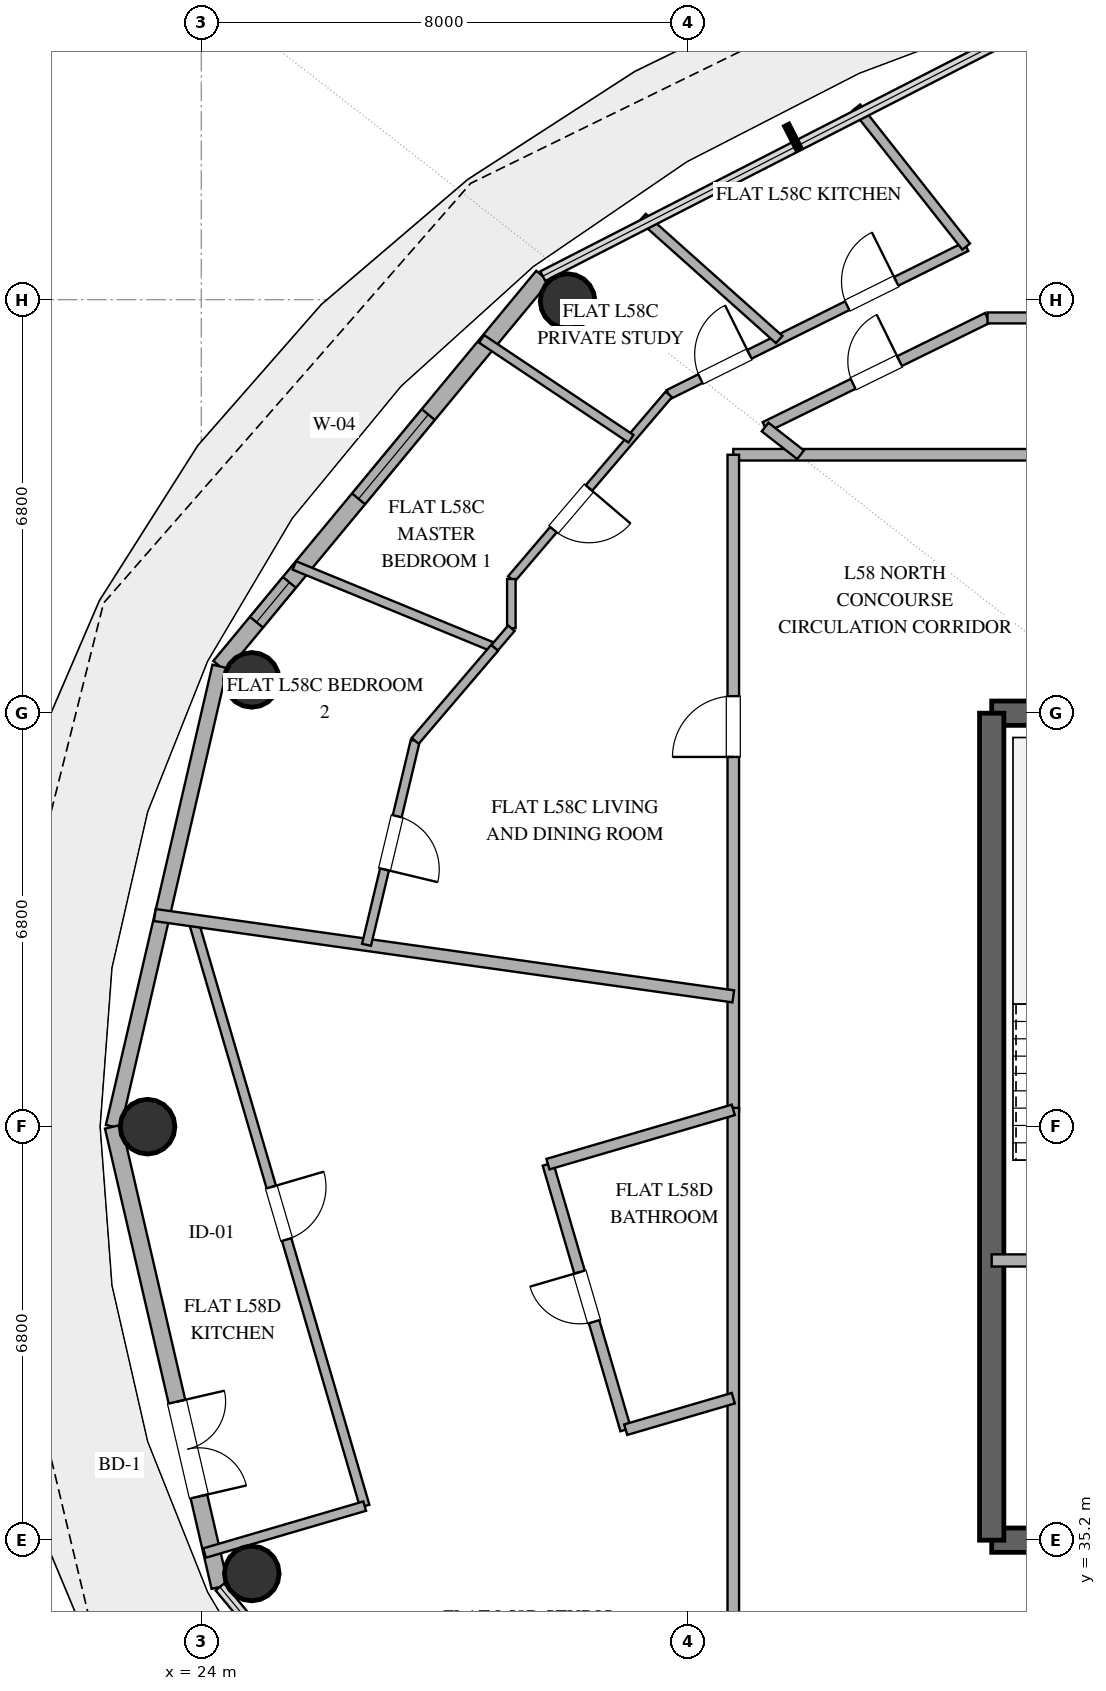
"""IFC4 building model, lengths in metres.
Left out: names, types, materials, properties, quantities, classifications, styles, units other than length and angle.
Written with IfcOpenShell. Run it as: python <this file> out.ifc"""

import sys

from ifc_helpers import new_model, si_unit, direction, frame, frame_2d, origin, origin_2d, place, context, subcontext, project, spatial, rectangle, hollow_circle, extrude, element, fill, save


model = new_model("IFC4")
c1 = context("Model", 3, precision=1e-05, world=origin(), true_north=direction((0.0, 1.0)))
c2 = subcontext(c1, "Body", "Model", "MODEL_VIEW")
j1 = project(units=[si_unit("LENGTHUNIT", "METRE"), si_unit("PLANEANGLEUNIT", "RADIAN")], contexts=[c1])
p1 = place(None, origin())
s1 = spatial("IfcSite", under=j1, at=p1, CompositionType="ELEMENT")
p2 = place(p1, origin())
s2 = spatial("IfcBuilding", under=s1, at=p2, CompositionType="ELEMENT")
p3 = place(p2, frame((0.0, 0.0, 228.0)))
s3 = spatial("IfcBuildingStorey", under=s2, at=p3, CompositionType="ELEMENT", Elevation=228.0)
p4 = place(p3, frame((37.0, 35.2, 0.0), z_axis=(0.0, 0.0, 1.0), x_axis=(1.0, 0.0, 0.0)))
e1 = element("IfcWall", 1, at=p4, inside=s3, PredefinedType="SHEAR", context=c2, shape_type="SweptSolid", body=[
    extrude(rectangle(XDim=4.0, YDim=0.4, at=frame_2d((2.0, 0.0))), origin(), (0.0, 0.0, 1.0), 3.36),
])
p5 = place(p4, frame((1.4, 0.0, 0.0)))
e2 = element("IfcOpeningElement", 2, at=p5, cuts=e1, PredefinedType="OPENING", context=c2, shape_type="SweptSolid", body=[
    extrude(rectangle(XDim=1.2, YDim=2.15, at=frame_2d((0.6, 1.075))), frame((0.0, 0.21, 0.0), z_axis=(0.0, -1.0, 0.0), x_axis=(1.0, 0.0, 0.0)), (0.0, 0.0, 1.0), 0.42),
])
p6 = place(p3, frame((37.0, 48.8, 0.0), z_axis=(0.0, 0.0, 1.0), x_axis=(1.0, 0.0, 0.0)))
e3 = element("IfcWall", 3, at=p6, inside=s3, PredefinedType="SHEAR", context=c2, shape_type="SweptSolid", body=[
    extrude(rectangle(XDim=4.0, YDim=0.4, at=frame_2d((2.0, 0.0))), origin(), (0.0, 0.0, 1.0), 3.36),
])
p7 = place(p3, frame((37.0, 35.2, 0.0), z_axis=(0.0, 0.0, 1.0), x_axis=(0.0, 1.0, 0.0)))
e4 = element("IfcWall", 4, at=p7, inside=s3, PredefinedType="SHEAR", context=c2, shape_type="SweptSolid", body=[
    extrude(rectangle(XDim=13.6, YDim=0.4, at=frame_2d((6.8, 0.0))), origin(), (0.0, 0.0, 1.0), 3.36),
])
for number, where, z_axis, x_axis in (
    (5, (30.025, 55.576, 0.0), (0.0, 0.0, 1.0), (1.0, 0.0, 0.0)),
    (6, (24.831, 49.347, 0.0), (0.0, 0.0, 1.0), (1.0, 0.0, 0.0)),
    (7, (23.117, 42.0, 0.0), (0.0, 0.0, 1.0), (1.0, 0.0, 0.0)),
    (8, (24.831, 34.653, 0.0), (0.0, 0.0, 1.0), (1.0, 0.0, 0.0)),
):
    element("IfcColumn", number, at=place(p3, frame(where, z_axis=z_axis, x_axis=x_axis)), inside=s3, PredefinedType="COLUMN", context=c2, shape_type="SweptSolid", body=[
        extrude(hollow_circle(Radius=0.45, WallThickness=0.025, at=origin_2d()), origin(), (0.0, 0.0, 1.0), 3.36),
    ])
p8 = place(p3, frame((29.617, 55.987, 0.0), z_axis=(0.0, 0.0, 1.0), x_axis=(-0.63761509934, -0.770355103243, 0.0)))
e9 = element("IfcWall", 9, at=p8, inside=s3, PredefinedType="SOLIDWALL", context=c2, shape_type="SweptSolid", body=[
    extrude(rectangle(XDim=8.33, YDim=0.28, at=frame_2d((4.165, 0.0))), origin(), (0.0, 0.0, 1.0), 3.36),
])
p9 = place(p8, frame((2.953, 0.0, 0.85)))
e10 = element("IfcOpeningElement", 10, at=p9, cuts=e9, PredefinedType="OPENING", context=c2, shape_type="SweptSolid", body=[
    extrude(rectangle(XDim=1.8, YDim=2.2, at=frame_2d((0.9, 1.1))), frame((0.0, 0.15, 0.0), z_axis=(0.0, -1.0, 0.0), x_axis=(1.0, 0.0, 0.0)), (0.0, 0.0, 1.0), 0.3),
])
p10 = place(p8, frame((6.536, 0.0, 0.85)))
e11 = element("IfcOpeningElement", 11, at=p10, cuts=e9, PredefinedType="OPENING", context=c2, shape_type="SweptSolid", body=[
    extrude(rectangle(XDim=0.85, YDim=1.8, at=frame_2d((0.425, 0.9))), frame((0.0, 0.15, 0.0), z_axis=(0.0, -1.0, 0.0), x_axis=(1.0, 0.0, 0.0)), (0.0, 0.0, 1.0), 0.3),
])
p11 = place(p3, frame((24.306, 49.57, 0.0), z_axis=(0.0, 0.0, 1.0), x_axis=(-0.225635078214, -0.974211892495, 0.0)))
e12 = element("IfcWall", 12, at=p11, inside=s3, PredefinedType="SOLIDWALL", context=c2, shape_type="SweptSolid", body=[
    extrude(rectangle(XDim=7.77, YDim=0.25, at=frame_2d((3.885, 0.0))), origin(), (0.0, 0.0, 1.0), 3.36),
])
p12 = place(p3, frame((22.553, 42.0, 0.0), z_axis=(0.0, 0.0, 1.0), x_axis=(0.225635078214, -0.974211892495, 0.0)))
e13 = element("IfcWall", 13, at=p12, inside=s3, PredefinedType="SOLIDWALL", context=c2, shape_type="SweptSolid", body=[
    extrude(rectangle(XDim=7.77, YDim=0.28, at=frame_2d((3.885, 0.0))), origin(), (0.0, 0.0, 1.0), 3.36),
])
p13 = place(p12, frame((4.642, 0.0, 0.0)))
e14 = element("IfcOpeningElement", 14, at=p13, cuts=e13, PredefinedType="OPENING", context=c2, shape_type="SweptSolid", body=[
    extrude(rectangle(XDim=1.6, YDim=2.25, at=frame_2d((0.8, 1.125))), frame((0.0, 0.15, 0.0), z_axis=(0.0, -1.0, 0.0), x_axis=(1.0, 0.0, 0.0)), (0.0, 0.0, 1.0), 0.3),
])
p14 = place(p3, frame((37.0, 39.8, 0.0), z_axis=(0.0, 0.0, 1.0), x_axis=(1.0, 0.0, 0.0)))
e15 = element("IfcWall", 15, at=p14, inside=s3, PredefinedType="SOLIDWALL", context=c2, shape_type="SweptSolid", body=[
    extrude(rectangle(XDim=4.0, YDim=0.2, at=frame_2d((2.0, 0.0))), origin(), (0.0, 0.0, 1.0), 2.72),
])
p15 = place(p14, frame((1.45, 0.0, 0.0)))
e16 = element("IfcOpeningElement", 16, at=p15, cuts=e15, PredefinedType="OPENING", context=c2, shape_type="SweptSolid", body=[
    extrude(rectangle(XDim=1.1, YDim=2.15, at=frame_2d((0.55, 1.075))), frame((0.0, 0.11, 0.0), z_axis=(0.0, -1.0, 0.0), x_axis=(1.0, 0.0, 0.0)), (0.0, 0.0, 1.0), 0.22),
])
p16 = place(p3, frame((23.868, 45.392, 0.0), z_axis=(0.0, 0.0, 1.0), x_axis=(0.281018983641, -0.959702209455, 0.0)))
e17 = element("IfcWall", 17, at=p16, inside=s3, PredefinedType="PLUMBINGWALL", context=c2, shape_type="SweptSolid", body=[
    extrude(rectangle(XDim=10.036, YDim=0.16, at=frame_2d((5.018, 0.0))), origin(), (0.0, 0.0, 1.0), 2.72),
])
p17 = place(p16, frame((4.568, 0.0, 0.0)))
e18 = element("IfcOpeningElement", 18, at=p17, cuts=e17, PredefinedType="OPENING", context=c2, shape_type="SweptSolid", body=[
    extrude(rectangle(XDim=0.9, YDim=2.1, at=frame_2d((0.45, 1.05))), frame((0.0, 0.09, 0.0), z_axis=(0.0, -1.0, 0.0), x_axis=(1.0, 0.0, 0.0)), (0.0, 0.0, 1.0), 0.18),
])
p18 = place(p3, frame((32.75, 53.05, 0.0), z_axis=(0.0, 0.0, 1.0), x_axis=(1.0, 0.0, 0.0)))
e19 = element("IfcWall", 19, at=p18, inside=s3, PredefinedType="PARTITIONING", context=c2, shape_type="SweptSolid", body=[
    extrude(rectangle(XDim=12.766, YDim=0.19, at=frame_2d((6.383, 0.0))), origin(), (0.0, 0.0, 1.0), 2.72),
])
p19 = place(p3, frame((32.75, 42.243, 0.0), z_axis=(0.0, 0.0, 1.0), x_axis=(0.0, 1.0, 0.0)))
e20 = element("IfcWall", 20, at=p19, inside=s3, PredefinedType="PARTITIONING", context=c2, shape_type="SweptSolid", body=[
    extrude(rectangle(XDim=10.807, YDim=0.19, at=frame_2d((5.404, 0.0))), origin(), (0.0, 0.0, 1.0), 2.72),
])
p20 = place(p19, frame((5.837, 0.0, 0.0)))
e21 = element("IfcOpeningElement", 21, at=p20, cuts=e20, PredefinedType="OPENING", context=c2, shape_type="SweptSolid", body=[
    extrude(rectangle(XDim=1.0, YDim=2.2, at=frame_2d((0.5, 1.1))), frame((0.0, 0.105, 0.0), z_axis=(0.0, -1.0, 0.0), x_axis=(1.0, 0.0, 0.0)), (0.0, 0.0, 1.0), 0.21),
])
p21 = place(p3, frame((32.75, 30.95, 0.0), z_axis=(0.0, 0.0, 1.0), x_axis=(0.0, 1.0, 0.0)))
e22 = element("IfcWall", 22, at=p21, inside=s3, PredefinedType="PARTITIONING", context=c2, shape_type="SweptSolid", body=[
    extrude(rectangle(XDim=11.36, YDim=0.19, at=frame_2d((5.68, 0.0))), origin(), (0.0, 0.0, 1.0), 2.72),
])
p22 = place(p3, frame((23.237, 45.48, 0.0), z_axis=(0.0, 0.0, 1.0), x_axis=(0.990269661234, -0.139161769316, 0.0)))
e23 = element("IfcWall", 23, at=p22, inside=s3, PredefinedType="PARTITIONING", context=c2, shape_type="SweptSolid", body=[
    extrude(rectangle(XDim=9.607, YDim=0.2, at=frame_2d((4.803, 0.0))), origin(), (0.0, 0.0, 1.0), 2.72),
])
p23 = place(p3, frame((30.98, 37.017, 0.0), z_axis=(0.0, 0.0, 1.0), x_axis=(-0.281021691617, 0.959701416504, 0.0)))
e24 = element("IfcWall", 24, at=p23, inside=s3, PredefinedType="PLUMBINGWALL", context=c2, shape_type="SweptSolid", body=[
    extrude(rectangle(XDim=4.551, YDim=0.18, at=frame_2d((2.275, 0.0))), origin(), (0.0, 0.0, 1.0), 2.72),
])
p24 = place(p23, frame((1.85, 0.0, 0.0)))
e25 = element("IfcOpeningElement", 25, at=p24, cuts=e24, PredefinedType="OPENING", context=c2, shape_type="SweptSolid", body=[
    extrude(rectangle(XDim=0.85, YDim=2.1, at=frame_2d((0.425, 1.05))), frame((0.0, 0.1, 0.0), z_axis=(0.0, -1.0, 0.0), x_axis=(1.0, 0.0, 0.0)), (0.0, 0.0, 1.0), 0.2),
])
p25 = place(p3, frame((33.273, 53.506, 0.0), z_axis=(0.0, 0.0, 1.0), x_axis=(0.89778136281, 0.440441397454, 0.0)))
e26 = element("IfcWall", 26, at=p25, inside=s3, PredefinedType="PLUMBINGWALL", context=c2, shape_type="SweptSolid", body=[
    extrude(rectangle(XDim=4.074, YDim=0.18, at=frame_2d((2.037, 0.0))), origin(), (0.0, 0.0, 1.0), 2.72),
])
p26 = place(p25, frame((1.612, 0.0, 0.0)))
e27 = element("IfcOpeningElement", 27, at=p26, cuts=e26, PredefinedType="OPENING", context=c2, shape_type="SweptSolid", body=[
    extrude(rectangle(XDim=0.85, YDim=2.1, at=frame_2d((0.425, 1.05))), frame((0.0, 0.1, 0.0), z_axis=(0.0, -1.0, 0.0), x_axis=(1.0, 0.0, 0.0)), (0.0, 0.0, 1.0), 0.2),
])
p27 = place(p3, frame((25.531, 51.229, 0.0), z_axis=(0.0, 0.0, 1.0), x_axis=(0.925009924445, -0.37994294266, 0.0)))
e28 = element("IfcWall", 28, at=p27, inside=s3, PredefinedType="PARTITIONING", context=c2, shape_type="SweptSolid", body=[
    extrude(rectangle(XDim=3.562, YDim=0.15, at=frame_2d((1.781, 0.0))), origin(), (0.0, 0.0, 1.0), 2.72),
])
p28 = place(p3, frame((31.689, 54.042, 0.0), z_axis=(0.0, 0.0, 1.0), x_axis=(0.895479575413, 0.445102606168, 0.0)))
e29 = element("IfcWall", 29, at=p28, inside=s3, PredefinedType="PLUMBINGWALL", context=c2, shape_type="SweptSolid", body=[
    extrude(rectangle(XDim=5.462, YDim=0.16, at=frame_2d((2.731, 0.0))), origin(), (0.0, 0.0, 1.0), 2.72),
])
p29 = place(p28, frame((3.278, 0.0, 0.0)))
e30 = element("IfcOpeningElement", 30, at=p29, cuts=e29, PredefinedType="OPENING", context=c2, shape_type="SweptSolid", body=[
    extrude(rectangle(XDim=0.9, YDim=2.1, at=frame_2d((0.45, 1.05))), frame((0.0, 0.09, 0.0), z_axis=(0.0, -1.0, 0.0), x_axis=(1.0, 0.0, 0.0)), (0.0, 0.0, 1.0), 0.18),
])
p30 = place(p28, frame((0.581, 0.0, 0.0)))
e31 = element("IfcOpeningElement", 31, at=p30, cuts=e29, PredefinedType="OPENING", context=c2, shape_type="SweptSolid", body=[
    extrude(rectangle(XDim=0.9, YDim=2.1, at=frame_2d((0.45, 1.05))), frame((0.0, 0.09, 0.0), z_axis=(0.0, -1.0, 0.0), x_axis=(1.0, 0.0, 0.0)), (0.0, 0.0, 1.0), 0.18),
])
p31 = place(p3, frame((27.519, 48.345, 0.0), z_axis=(0.0, 0.0, 1.0), x_axis=(-0.232293676314, -0.97264569497, 0.0)))
e32 = element("IfcWall", 32, at=p31, inside=s3, PredefinedType="PARTITIONING", context=c2, shape_type="SweptSolid", body=[
    extrude(rectangle(XDim=3.448, YDim=0.15, at=frame_2d((1.724, 0.0))), origin(), (0.0, 0.0, 1.0), 2.72),
])
p32 = place(p31, frame((1.274, 0.0, 0.0)))
e33 = element("IfcOpeningElement", 33, at=p32, cuts=e32, PredefinedType="OPENING", context=c2, shape_type="SweptSolid", body=[
    extrude(rectangle(XDim=0.9, YDim=2.1, at=frame_2d((0.45, 1.05))), frame((0.0, 0.085, 0.0), z_axis=(0.0, -1.0, 0.0), x_axis=(1.0, 0.0, 0.0)), (0.0, 0.0, 1.0), 0.17),
])
p33 = place(p3, frame((29.702, 41.384, 0.0), z_axis=(0.0, 0.0, 1.0), x_axis=(0.959705055225, 0.281009264929, 0.0)))
e34 = element("IfcWall", 34, at=p33, inside=s3, PredefinedType="PLUMBINGWALL", context=c2, shape_type="SweptSolid", body=[
    extrude(rectangle(XDim=3.176, YDim=0.18, at=frame_2d((1.588, 0.0))), origin(), (0.0, 0.0, 1.0), 2.72),
])
p34 = place(p3, frame((31.689, 54.042, 0.0), z_axis=(0.0, 0.0, 1.0), x_axis=(-0.648985159088, -0.760801066826, 0.0)))
e35 = element("IfcWall", 35, at=p34, inside=s3, PredefinedType="PARTITIONING", context=c2, shape_type="SweptSolid", body=[
    extrude(rectangle(XDim=3.989, YDim=0.14, at=frame_2d((1.995, 0.0))), origin(), (0.0, 0.0, 1.0), 2.72),
])
p35 = place(p34, frame((2.023, 0.0, 0.0)))
e36 = element("IfcOpeningElement", 36, at=p35, cuts=e35, PredefinedType="OPENING", context=c2, shape_type="SweptSolid", body=[
    extrude(rectangle(XDim=0.9, YDim=2.1, at=frame_2d((0.45, 1.05))), frame((0.0, 0.08, 0.0), z_axis=(0.0, -1.0, 0.0), x_axis=(1.0, 0.0, 0.0)), (0.0, 0.0, 1.0), 0.16),
])
p36 = place(p3, frame((33.505, 54.945, 0.0), z_axis=(0.0, 0.0, 1.0), x_axis=(-0.745914664094, 0.66604152565, 0.0)))
e37 = element("IfcWall", 37, at=p36, inside=s3, PredefinedType="PLUMBINGWALL", context=c2, shape_type="SweptSolid", body=[
    extrude(rectangle(XDim=3.014, YDim=0.16, at=frame_2d((1.507, 0.0))), origin(), (0.0, 0.0, 1.0), 2.72),
])
p37 = place(p3, frame((28.609, 54.956, 0.0), z_axis=(0.0, 0.0, 1.0), x_axis=(0.831478101563, -0.555557527733, 0.0)))
e38 = element("IfcWall", 38, at=p37, inside=s3, PredefinedType="PARTITIONING", context=c2, shape_type="SweptSolid", body=[
    extrude(rectangle(XDim=2.956, YDim=0.15, at=frame_2d((1.478, 0.0))), origin(), (0.0, 0.0, 1.0), 2.72),
])
p38 = place(p3, frame((36.58, 56.473, 0.0), z_axis=(0.0, 0.0, 1.0), x_axis=(-0.619378047354, 0.785092882694, 0.0)))
e39 = element("IfcWall", 39, at=p38, inside=s3, PredefinedType="PLUMBINGWALL", context=c2, shape_type="SweptSolid", body=[
    extrude(rectangle(XDim=2.914, YDim=0.16, at=frame_2d((1.457, 0.0))), origin(), (0.0, 0.0, 1.0), 2.72),
])
p39 = place(p3, frame((26.688, 35.76, 0.0), z_axis=(0.0, 0.0, 1.0), x_axis=(-0.959690607454, -0.281058602368, 0.0)))
e40 = element("IfcWall", 40, at=p39, inside=s3, PredefinedType="PLUMBINGWALL", context=c2, shape_type="SweptSolid", body=[
    extrude(rectangle(XDim=2.745, YDim=0.16, at=frame_2d((1.373, 0.0))), origin(), (0.0, 0.0, 1.0), 2.72),
])
p40 = place(p3, frame((28.826, 49.876, 0.0), z_axis=(0.0, 0.0, 1.0), x_axis=(-0.649252114502, -0.760573265251, 0.0)))
e41 = element("IfcWall", 41, at=p40, inside=s3, PredefinedType="PARTITIONING", context=c2, shape_type="SweptSolid", body=[
    extrude(rectangle(XDim=2.013, YDim=0.15, at=frame_2d((1.007, 0.0))), origin(), (0.0, 0.0, 1.0), 2.72),
])
p41 = place(p3, frame((32.75, 37.535, 0.0), z_axis=(0.0, 0.0, 1.0), x_axis=(-0.959679055102, -0.281098045527, 0.0)))
e42 = element("IfcWall", 42, at=p41, inside=s3, PredefinedType="PLUMBINGWALL", context=c2, shape_type="SweptSolid", body=[
    extrude(rectangle(XDim=1.844, YDim=0.18, at=frame_2d((0.922, 0.0))), origin(), (0.0, 0.0, 1.0), 2.72),
])
p42 = place(p3, frame((36.931, 55.3, 0.0), z_axis=(0.0, 0.0, 1.0), x_axis=(1.0, 0.0, 0.0)))
e43 = element("IfcWall", 43, at=p42, inside=s3, PredefinedType="PLUMBINGWALL", context=c2, shape_type="SweptSolid", body=[
    extrude(rectangle(XDim=1.748, YDim=0.18, at=frame_2d((0.874, 0.0))), origin(), (0.0, 0.0, 1.0), 2.72),
])
p43 = place(p3, frame((29.1, 51.007, 0.0), z_axis=(0.0, 0.0, 1.0), x_axis=(0.0, -1.0, 0.0)))
e44 = element("IfcWall", 44, at=p43, inside=s3, PredefinedType="PARTITIONING", context=c2, shape_type="SweptSolid", body=[
    extrude(rectangle(XDim=0.81, YDim=0.14, at=frame_2d((0.405, 0.0))), origin(), (0.0, 0.0, 1.0), 2.72),
])
p44 = place(p3, frame((33.857, 53.05, 0.0), z_axis=(0.0, 0.0, 1.0), x_axis=(-0.788214334349, 0.615400815019, 0.0)))
e45 = element("IfcWall", 45, at=p44, inside=s3, PredefinedType="PLUMBINGWALL", context=c2, shape_type="SweptSolid", body=[
    extrude(rectangle(XDim=0.74, YDim=0.18, at=frame_2d((0.37, 0.0))), origin(), (0.0, 0.0, 1.0), 2.72),
])
p45 = place(p3, frame((29.1, 50.197, 0.0), z_axis=(0.0, 0.0, 1.0), x_axis=(-0.649360360175, -0.760480849617, 0.0)))
e46 = element("IfcWall", 46, at=p45, inside=s3, PredefinedType="PARTITIONING", context=c2, shape_type="SweptSolid", body=[
    extrude(rectangle(XDim=0.422, YDim=0.14, at=frame_2d((0.211, 0.0))), origin(), (0.0, 0.0, 1.0), 2.72),
])
p46 = place(p9, origin())
e47 = element("IfcWindow", 47, at=p46, inside=s3, PartitioningType="SINGLE_PANEL", PredefinedType="WINDOW", context=c2, shape_type="SweptSolid", body=[
    extrude(rectangle(XDim=1.8, YDim=2.2, at=frame_2d((0.9, 1.1))), frame((0.0, 0.03, 0.0), z_axis=(0.0, -1.0, 0.0), x_axis=(1.0, 0.0, 0.0)), (0.0, 0.0, 1.0), 0.06),
])
fill(e10, e47)
p47 = place(p13, origin())
e48 = element("IfcDoor", 48, at=p47, inside=s3, OperationType="DOUBLE_DOOR_SINGLE_SWING", PredefinedType="DOOR", context=c2, shape_type="SweptSolid", body=[
    extrude(rectangle(XDim=1.6, YDim=2.25, at=frame_2d((0.8, 1.125))), frame((0.0, 0.025, 0.0), z_axis=(0.0, -1.0, 0.0), x_axis=(1.0, 0.0, 0.0)), (0.0, 0.0, 1.0), 0.05),
])
fill(e14, e48)
p48 = place(p10, origin())
e49 = element("IfcWindow", 49, at=p48, inside=s3, PartitioningType="SINGLE_PANEL", PredefinedType="WINDOW", context=c2, shape_type="SweptSolid", body=[
    extrude(rectangle(XDim=0.85, YDim=1.8, at=frame_2d((0.425, 0.9))), frame((0.0, 0.03, 0.0), z_axis=(0.0, -1.0, 0.0), x_axis=(1.0, 0.0, 0.0)), (0.0, 0.0, 1.0), 0.06),
])
fill(e11, e49)
p49 = place(p17, origin())
e50 = element("IfcDoor", 50, at=p49, inside=s3, OperationType="SINGLE_SWING_LEFT", PredefinedType="DOOR", context=c2, shape_type="SweptSolid", body=[
    extrude(rectangle(XDim=0.9, YDim=2.1, at=frame_2d((0.45, 1.05))), frame((0.0, 0.025, 0.0), z_axis=(0.0, -1.0, 0.0), x_axis=(1.0, 0.0, 0.0)), (0.0, 0.0, 1.0), 0.05),
])
fill(e18, e50)
p50 = place(p20, origin())
e51 = element("IfcDoor", 51, at=p50, inside=s3, OperationType="SINGLE_SWING_LEFT", PredefinedType="DOOR", context=c2, shape_type="SweptSolid", body=[
    extrude(rectangle(XDim=1.0, YDim=2.2, at=frame_2d((0.5, 1.1))), frame((0.0, 0.025, 0.0), z_axis=(0.0, -1.0, 0.0), x_axis=(1.0, 0.0, 0.0)), (0.0, 0.0, 1.0), 0.05),
])
fill(e21, e51)
p51 = place(p24, origin())
e52 = element("IfcDoor", 52, at=p51, inside=s3, OperationType="SINGLE_SWING_RIGHT", PredefinedType="DOOR", context=c2, shape_type="SweptSolid", body=[
    extrude(rectangle(XDim=0.85, YDim=2.1, at=frame_2d((0.425, 1.05))), frame((0.0, 0.025, 0.0), z_axis=(0.0, -1.0, 0.0), x_axis=(1.0, 0.0, 0.0)), (0.0, 0.0, 1.0), 0.05),
])
fill(e25, e52)
p52 = place(p26, origin())
e53 = element("IfcDoor", 53, at=p52, inside=s3, OperationType="SINGLE_SWING_RIGHT", PredefinedType="DOOR", context=c2, shape_type="SweptSolid", body=[
    extrude(rectangle(XDim=0.85, YDim=2.1, at=frame_2d((0.425, 1.05))), frame((0.0, 0.025, 0.0), z_axis=(0.0, -1.0, 0.0), x_axis=(1.0, 0.0, 0.0)), (0.0, 0.0, 1.0), 0.05),
])
fill(e27, e53)
p53 = place(p29, origin())
e54 = element("IfcDoor", 54, at=p53, inside=s3, OperationType="SINGLE_SWING_RIGHT", PredefinedType="DOOR", context=c2, shape_type="SweptSolid", body=[
    extrude(rectangle(XDim=0.9, YDim=2.1, at=frame_2d((0.45, 1.05))), frame((0.0, 0.025, 0.0), z_axis=(0.0, -1.0, 0.0), x_axis=(1.0, 0.0, 0.0)), (0.0, 0.0, 1.0), 0.05),
])
fill(e30, e54)
p54 = place(p30, origin())
e55 = element("IfcDoor", 55, at=p54, inside=s3, OperationType="SINGLE_SWING_RIGHT", PredefinedType="DOOR", context=c2, shape_type="SweptSolid", body=[
    extrude(rectangle(XDim=0.9, YDim=2.1, at=frame_2d((0.45, 1.05))), frame((0.0, 0.025, 0.0), z_axis=(0.0, -1.0, 0.0), x_axis=(1.0, 0.0, 0.0)), (0.0, 0.0, 1.0), 0.05),
])
fill(e31, e55)
p55 = place(p32, origin())
e56 = element("IfcDoor", 56, at=p55, inside=s3, OperationType="SINGLE_SWING_RIGHT", PredefinedType="DOOR", context=c2, shape_type="SweptSolid", body=[
    extrude(rectangle(XDim=0.9, YDim=2.1, at=frame_2d((0.45, 1.05))), frame((0.0, 0.025, 0.0), z_axis=(0.0, -1.0, 0.0), x_axis=(1.0, 0.0, 0.0)), (0.0, 0.0, 1.0), 0.05),
])
fill(e33, e56)
p56 = place(p35, origin())
e57 = element("IfcDoor", 57, at=p56, inside=s3, OperationType="SINGLE_SWING_LEFT", PredefinedType="DOOR", context=c2, shape_type="SweptSolid", body=[
    extrude(rectangle(XDim=0.9, YDim=2.1, at=frame_2d((0.45, 1.05))), frame((0.0, 0.025, 0.0), z_axis=(0.0, -1.0, 0.0), x_axis=(1.0, 0.0, 0.0)), (0.0, 0.0, 1.0), 0.05),
])
fill(e36, e57)
save(model, sys.argv[1])
